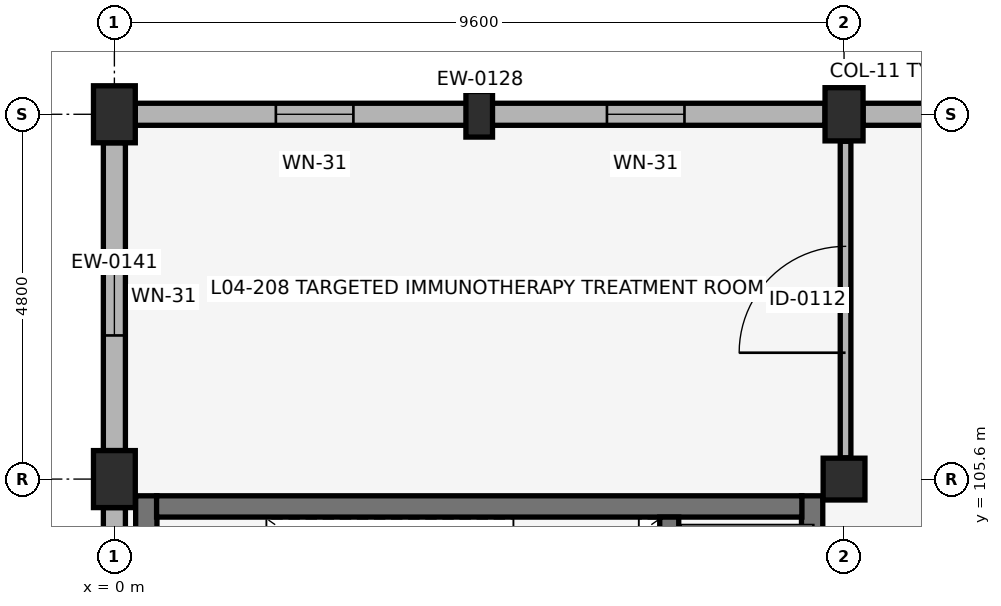
"""IFC4 building model, lengths in metres.
Left out: names, types, materials, properties, quantities, classifications, styles, units other than length and angle.
Written with IfcOpenShell. Run it as: python <this file> out.ifc"""

import sys

from ifc_helpers import new_model, si_unit, direction, frame, frame_2d, origin, origin_2d, place, context, subcontext, project, spatial, rectangle, extrude, element, fill, save


model = new_model("IFC4")
c1 = context("Model", 3, precision=1e-05, world=origin(), true_north=direction((0.0, 1.0)))
c2 = subcontext(c1, "Body", "Model", "MODEL_VIEW")
j1 = project(units=[si_unit("LENGTHUNIT", "METRE"), si_unit("PLANEANGLEUNIT", "RADIAN")], contexts=[c1])
p1 = place(None, origin())
s1 = spatial("IfcSite", under=j1, at=p1, CompositionType="ELEMENT")
p2 = place(p1, origin())
s2 = spatial("IfcBuilding", under=s1, at=p2, CompositionType="ELEMENT")
p3 = place(p2, frame((0.0, 0.0, 16.66)))
s3 = spatial("IfcBuildingStorey", under=s2, at=p3, CompositionType="ELEMENT", Elevation=16.66)
for number, where, z_axis, x_axis in (
    (1, (0.0, 105.6, 0.0), (0.0, 0.0, 1.0), (1.0, 0.0, 0.0)),
    (2, (0.0, 110.4, 0.0), (0.0, 0.0, 1.0), (1.0, 0.0, 0.0)),
):
    element("IfcColumn", number, at=place(p3, frame(where, z_axis=z_axis, x_axis=x_axis)), inside=s3, PredefinedType="COLUMN", context=c2, shape_type="SweptSolid", body=[
        extrude(rectangle(XDim=0.55, YDim=0.75, at=origin_2d()), origin(), (0.0, 0.0, 1.0), 4.08),
    ])
p4 = place(p3, frame((9.6, 105.6, 0.0), z_axis=(0.0, 0.0, 1.0), x_axis=(1.0, 0.0, 0.0)))
e3 = element("IfcColumn", 3, at=p4, inside=s3, PredefinedType="COLUMN", context=c2, shape_type="SweptSolid", body=[
    extrude(rectangle(XDim=0.55, YDim=0.55, at=origin_2d()), origin(), (0.0, 0.0, 1.0), 4.08),
])
p5 = place(p3, frame((9.6, 110.4, 0.0), z_axis=(0.0, 0.0, 1.0), x_axis=(1.0, 0.0, 0.0)))
e4 = element("IfcColumn", 4, at=p5, inside=s3, PredefinedType="COLUMN", context=c2, shape_type="SweptSolid", body=[
    extrude(rectangle(XDim=0.5, YDim=0.7, at=origin_2d()), origin(), (0.0, 0.0, 1.0), 4.08),
])
p6 = place(p3, frame((4.8, 110.4, 0.0), z_axis=(0.0, 0.0, 1.0), x_axis=(1.0, 0.0, 0.0)))
e5 = element("IfcColumn", 5, at=p6, inside=s3, PredefinedType="PILASTER", context=c2, shape_type="SweptSolid", body=[
    extrude(rectangle(XDim=0.35, YDim=0.6, at=origin_2d()), origin(), (0.0, 0.0, 1.0), 4.08),
])
p7 = place(p3, frame((9.35, 110.4, 0.0), z_axis=(0.0, 0.0, 1.0), x_axis=(-1.0, 0.0, 0.0)))
e6 = element("IfcWall", 6, at=p7, inside=s3, PredefinedType="SOLIDWALL", context=c2, shape_type="SweptSolid", body=[
    extrude(rectangle(XDim=9.075, YDim=0.29, at=frame_2d((4.538, 0.0))), origin(), (0.0, 0.0, 1.0), 3.08),
])
p8 = place(p7, frame((1.85, 0.0, 0.88)))
e7 = element("IfcOpeningElement", 7, at=p8, cuts=e6, PredefinedType="OPENING", context=c2, shape_type="SweptSolid", body=[
    extrude(rectangle(XDim=1.02, YDim=1.88, at=frame_2d((0.51, 0.94))), frame((0.0, 0.155, 0.0), z_axis=(0.0, -1.0, 0.0), x_axis=(1.0, 0.0, 0.0)), (0.0, 0.0, 1.0), 0.31),
])
p9 = place(p7, frame((6.206, 0.0, 0.88)))
e8 = element("IfcOpeningElement", 8, at=p9, cuts=e6, PredefinedType="OPENING", context=c2, shape_type="SweptSolid", body=[
    extrude(rectangle(XDim=1.02, YDim=1.88, at=frame_2d((0.51, 0.94))), frame((0.0, 0.155, 0.0), z_axis=(0.0, -1.0, 0.0), x_axis=(1.0, 0.0, 0.0)), (0.0, 0.0, 1.0), 0.31),
])
p10 = place(p3, frame((18.95, 110.4, 0.0), z_axis=(0.0, 0.0, 1.0), x_axis=(-1.0, 0.0, 0.0)))
e9 = element("IfcWall", 9, at=p10, inside=s3, PredefinedType="SOLIDWALL", context=c2, shape_type="SweptSolid", body=[
    extrude(rectangle(XDim=9.1, YDim=0.29, at=frame_2d((4.55, 0.0))), origin(), (0.0, 0.0, 1.0), 3.08),
])
p11 = place(p10, frame((1.856, 0.0, 0.88)))
e10 = element("IfcOpeningElement", 10, at=p11, cuts=e9, PredefinedType="OPENING", context=c2, shape_type="SweptSolid", body=[
    extrude(rectangle(XDim=1.02, YDim=1.88, at=frame_2d((0.51, 0.94))), frame((0.0, 0.155, 0.0), z_axis=(0.0, -1.0, 0.0), x_axis=(1.0, 0.0, 0.0)), (0.0, 0.0, 1.0), 0.31),
])
p12 = place(p10, frame((6.224, 0.0, 0.88)))
e11 = element("IfcOpeningElement", 11, at=p12, cuts=e9, PredefinedType="OPENING", context=c2, shape_type="SweptSolid", body=[
    extrude(rectangle(XDim=1.02, YDim=1.88, at=frame_2d((0.51, 0.94))), frame((0.0, 0.155, 0.0), z_axis=(0.0, -1.0, 0.0), x_axis=(1.0, 0.0, 0.0)), (0.0, 0.0, 1.0), 0.31),
])
p13 = place(p3, frame((0.0, 105.225, 0.0), z_axis=(0.0, 0.0, 1.0), x_axis=(0.0, -1.0, 0.0)))
e12 = element("IfcWall", 12, at=p13, inside=s3, PredefinedType="SOLIDWALL", context=c2, shape_type="SweptSolid", body=[
    extrude(rectangle(XDim=6.45, YDim=0.29, at=frame_2d((3.225, 0.0))), origin(), (0.0, 0.0, 1.0), 3.08),
])
p14 = place(p3, frame((0.0, 110.025, 0.0), z_axis=(0.0, 0.0, 1.0), x_axis=(0.0, -1.0, 0.0)))
e13 = element("IfcWall", 13, at=p14, inside=s3, PredefinedType="SOLIDWALL", context=c2, shape_type="SweptSolid", body=[
    extrude(rectangle(XDim=4.05, YDim=0.29, at=frame_2d((2.025, 0.0))), origin(), (0.0, 0.0, 1.0), 3.08),
])
p15 = place(p14, frame((1.515, 0.0, 0.88)))
e14 = element("IfcOpeningElement", 14, at=p15, cuts=e13, PredefinedType="OPENING", context=c2, shape_type="SweptSolid", body=[
    extrude(rectangle(XDim=1.02, YDim=1.88, at=frame_2d((0.51, 0.94))), frame((0.0, 0.155, 0.0), z_axis=(0.0, -1.0, 0.0), x_axis=(1.0, 0.0, 0.0)), (0.0, 0.0, 1.0), 0.31),
])
for number, where, z_axis, x_axis in (
    (15, (0.42, 101.3, 0.0), (0.0, 0.0, 1.0), (0.0, 1.0, 0.0)),
    (16, (9.18, 101.3, 0.0), (0.0, 0.0, 1.0), (0.0, 1.0, 0.0)),
):
    element("IfcWall", number, at=place(p3, frame(where, z_axis=z_axis, x_axis=x_axis)), inside=s3, PredefinedType="SHEAR", context=c2, shape_type="SweptSolid", body=[
        extrude(rectangle(XDim=4.08, YDim=0.28, at=frame_2d((2.04, 0.0))), origin(), (0.0, 0.0, 1.0), 3.8),
    ])
p16 = place(p3, frame((0.555, 105.24, 0.0), z_axis=(0.0, 0.0, 1.0), x_axis=(1.0, 0.0, 0.0)))
e17 = element("IfcWall", 17, at=p16, inside=s3, PredefinedType="SHEAR", context=c2, shape_type="SweptSolid", body=[
    extrude(rectangle(XDim=8.49, YDim=0.28, at=frame_2d((4.245, 0.0))), origin(), (0.0, 0.0, 1.0), 3.8),
])
p17 = place(p3, frame((7.3, 101.56, 0.0), z_axis=(0.0, 0.0, 1.0), x_axis=(0.0, 1.0, 0.0)))
e18 = element("IfcWall", 18, at=p17, inside=s3, PredefinedType="SHEAR", context=c2, shape_type="SweptSolid", body=[
    extrude(rectangle(XDim=3.54, YDim=0.25, at=frame_2d((1.77, 0.0))), origin(), (0.0, 0.0, 1.0), 3.8),
])
p18 = place(p3, frame((9.62, 105.88, 0.0), z_axis=(0.0, 0.0, 1.0), x_axis=(0.0, 1.0, 0.0)))
e19 = element("IfcWall", 19, at=p18, inside=s3, PredefinedType="PARTITIONING", context=c2, shape_type="SweptSolid", body=[
    extrude(rectangle(XDim=4.165, YDim=0.14, at=frame_2d((2.083, 0.0))), origin(), (0.0, 0.0, 1.0), 3.12),
])
p19 = place(p18, frame((1.383, 0.0, 0.0)))
e20 = element("IfcOpeningElement", 20, at=p19, cuts=e19, PredefinedType="OPENING", context=c2, shape_type="SweptSolid", body=[
    extrude(rectangle(XDim=1.4, YDim=2.12, at=frame_2d((0.7, 1.06))), frame((0.0, 0.08, 0.0), z_axis=(0.0, -1.0, 0.0), x_axis=(1.0, 0.0, 0.0)), (0.0, 0.0, 1.0), 0.16),
])
p20 = place(p8, origin())
e21 = element("IfcWindow", 21, at=p20, inside=s3, PartitioningType="SINGLE_PANEL", PredefinedType="WINDOW", context=c2, shape_type="SweptSolid", body=[
    extrude(rectangle(XDim=1.02, YDim=1.88, at=frame_2d((0.51, 0.94))), frame((0.0, 0.03, 0.0), z_axis=(0.0, -1.0, 0.0), x_axis=(1.0, 0.0, 0.0)), (0.0, 0.0, 1.0), 0.06),
])
fill(e7, e21)
p21 = place(p9, origin())
e22 = element("IfcWindow", 22, at=p21, inside=s3, PartitioningType="SINGLE_PANEL", PredefinedType="WINDOW", context=c2, shape_type="SweptSolid", body=[
    extrude(rectangle(XDim=1.02, YDim=1.88, at=frame_2d((0.51, 0.94))), frame((0.0, 0.03, 0.0), z_axis=(0.0, -1.0, 0.0), x_axis=(1.0, 0.0, 0.0)), (0.0, 0.0, 1.0), 0.06),
])
fill(e8, e22)
p22 = place(p15, origin())
e23 = element("IfcWindow", 23, at=p22, inside=s3, PartitioningType="SINGLE_PANEL", PredefinedType="WINDOW", context=c2, shape_type="SweptSolid", body=[
    extrude(rectangle(XDim=1.02, YDim=1.88, at=frame_2d((0.51, 0.94))), frame((0.0, 0.03, 0.0), z_axis=(0.0, -1.0, 0.0), x_axis=(1.0, 0.0, 0.0)), (0.0, 0.0, 1.0), 0.06),
])
fill(e14, e23)
p23 = place(p19, origin())
e24 = element("IfcDoor", 24, at=p23, inside=s3, OperationType="SINGLE_SWING_LEFT", PredefinedType="DOOR", context=c2, shape_type="SweptSolid", body=[
    extrude(rectangle(XDim=1.4, YDim=2.12, at=frame_2d((0.7, 1.06))), frame((0.0, 0.025, 0.0), z_axis=(0.0, -1.0, 0.0), x_axis=(1.0, 0.0, 0.0)), (0.0, 0.0, 1.0), 0.05),
])
fill(e20, e24)
save(model, sys.argv[1])
